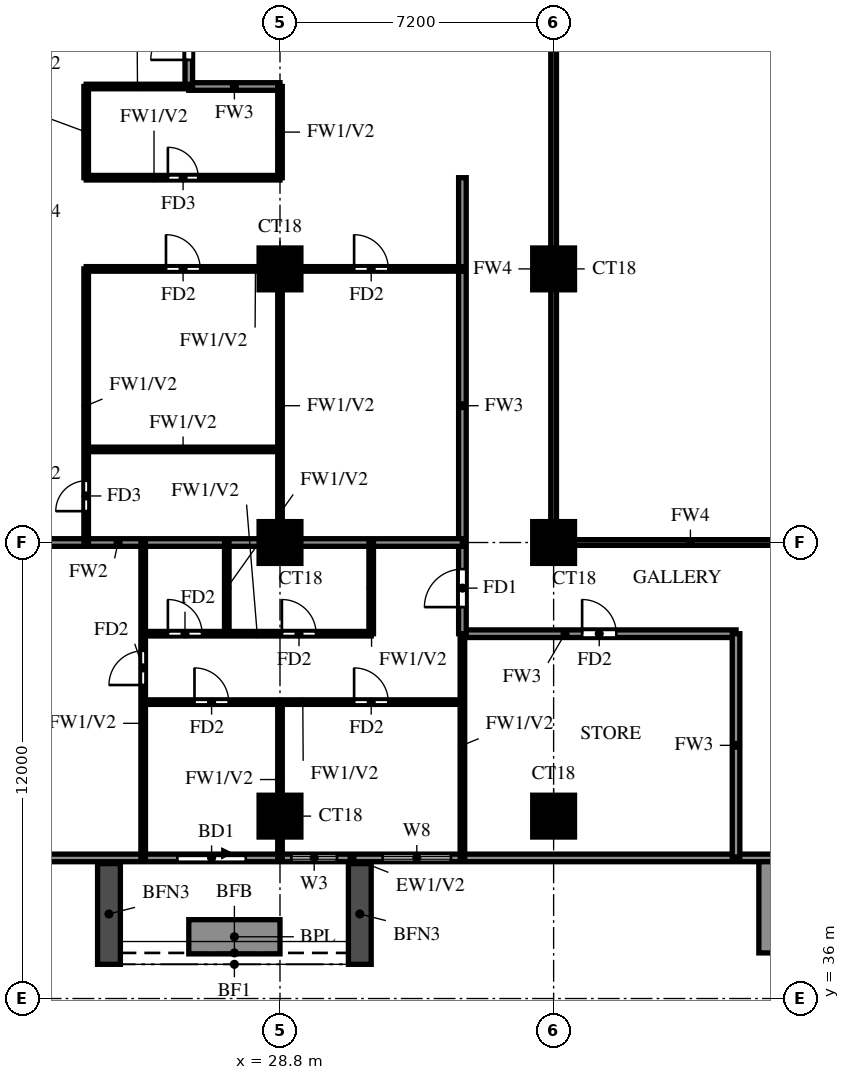
"""IFC4 building model, lengths in metres.
Left out: names, types, materials, properties, quantities, classifications, styles, units other than length and angle.
Written with IfcOpenShell. Run it as: python <this file> out.ifc"""

import sys

from ifc_helpers import new_model, si_unit, direction, frame, frame_2d, origin, origin_2d, place, context, subcontext, project, spatial, rectangle, extrude, source, transform, mapped, element, fill, save


model = new_model("IFC4")
c1 = context("Model", 3, precision=1e-05, world=origin(), true_north=direction((0.0, 1.0)))
c2 = subcontext(c1, "Body", "Model", "MODEL_VIEW")
j1 = project(units=[si_unit("LENGTHUNIT", "METRE"), si_unit("PLANEANGLEUNIT", "RADIAN")], contexts=[c1])
p1 = place(None, origin())
s1 = spatial("IfcSite", under=j1, at=p1, CompositionType="ELEMENT")
p2 = place(p1, origin())
s2 = spatial("IfcBuilding", under=s1, at=p2, CompositionType="ELEMENT")
p3 = place(p2, frame((0.0, 0.0, 120.0)))
s3 = spatial("IfcBuildingStorey", under=s2, at=p3, CompositionType="ELEMENT", Elevation=120.0)
m1 = source(origin(), c2, "Body", "SweptSolid", [
    extrude(rectangle(XDim=1.1, YDim=1.1, at=origin_2d()), origin(), (0.0, 0.0, 1.0), 3.2),
])
for number, where, z_axis, x_axis in (
    (1, (28.8, 40.8, 0.0), (0.0, 0.0, 1.0), (1.0, 0.0, 0.0)),
    (2, (36.0, 40.8, 0.0), (0.0, 0.0, 1.0), (1.0, 0.0, 0.0)),
    (3, (28.8, 48.0, 0.0), (0.0, 0.0, 1.0), (1.0, 0.0, 0.0)),
    (4, (36.0, 48.0, 0.0), (0.0, 0.0, 1.0), (1.0, 0.0, 0.0)),
    (5, (28.8, 55.2, 0.0), (0.0, 0.0, 1.0), (1.0, 0.0, 0.0)),
    (6, (36.0, 55.2, 0.0), (0.0, 0.0, 1.0), (1.0, 0.0, 0.0)),
):
    element("IfcColumn", number, at=place(p3, frame(where, z_axis=z_axis, x_axis=x_axis)), inside=s3, PredefinedType="COLUMN", context=c2, shape_type="MappedRepresentation", body=[
        mapped(m1, transform((0.0, 0.0, 0.0))),
    ])
p4 = place(p3, frame((18.2, 39.7, 0.0), z_axis=(0.0, 0.0, 1.0), x_axis=(1.0, 0.0, 0.0)))
e7 = element("IfcWall", 7, at=p4, inside=s3, PredefinedType="SOLIDWALL", context=c2, shape_type="SweptSolid", body=[
    extrude(rectangle(XDim=23.8, YDim=0.2, at=frame_2d((11.9, 0.0))), origin(), (0.0, 0.0, 1.0), 3.2),
])
p5 = place(p4, frame((7.9, 0.0, 0.0)))
e8 = element("IfcOpeningElement", 8, at=p5, cuts=e7, PredefinedType="OPENING", context=c2, shape_type="SweptSolid", body=[
    extrude(rectangle(XDim=1.8, YDim=2.4, at=frame_2d((0.9, 1.2))), frame((0.0, 0.11, 0.0), z_axis=(0.0, -1.0, 0.0), x_axis=(1.0, 0.0, 0.0)), (0.0, 0.0, 1.0), 0.22),
])
p6 = place(p4, frame((1.8, 0.0, 0.6)))
e9 = element("IfcOpeningElement", 9, at=p6, cuts=e7, PredefinedType="OPENING", context=c2, shape_type="SweptSolid", body=[
    extrude(rectangle(XDim=2.4, YDim=2.4, at=frame_2d((1.2, 1.2))), frame((0.0, 0.11, 0.0), z_axis=(0.0, -1.0, 0.0), x_axis=(1.0, 0.0, 0.0)), (0.0, 0.0, 1.0), 0.22),
])
p7 = place(p4, frame((10.9, 0.0, 0.6)))
e10 = element("IfcOpeningElement", 10, at=p7, cuts=e7, PredefinedType="OPENING", context=c2, shape_type="SweptSolid", body=[
    extrude(rectangle(XDim=1.2, YDim=2.4, at=frame_2d((0.6, 1.2))), frame((0.0, 0.11, 0.0), z_axis=(0.0, -1.0, 0.0), x_axis=(1.0, 0.0, 0.0)), (0.0, 0.0, 1.0), 0.22),
])
p8 = place(p4, frame((13.3, 0.0, 0.6)))
e11 = element("IfcOpeningElement", 11, at=p8, cuts=e7, PredefinedType="OPENING", context=c2, shape_type="SweptSolid", body=[
    extrude(rectangle(XDim=1.8, YDim=2.4, at=frame_2d((0.9, 1.2))), frame((0.0, 0.11, 0.0), z_axis=(0.0, -1.0, 0.0), x_axis=(1.0, 0.0, 0.0)), (0.0, 0.0, 1.0), 0.22),
])
for number, where, z_axis, x_axis in (
    (12, (24.3, 39.55, 0.0), (0.0, 0.0, 1.0), (0.0, -1.0, 0.0)),
    (13, (30.9, 39.55, 0.0), (0.0, 0.0, 1.0), (0.0, -1.0, 0.0)),
):
    element("IfcWall", number, at=place(p3, frame(where, z_axis=z_axis, x_axis=x_axis)), inside=s3, PredefinedType="SOLIDWALL", context=c2, shape_type="SweptSolid", body=[
        extrude(rectangle(XDim=2.65, YDim=0.6, at=frame_2d((1.325, 0.0))), origin(), (0.0, 0.0, 1.0), 2.85),
    ])
p9 = place(p3, frame((26.4, 37.625, 0.0), z_axis=(0.0, 0.0, 1.0), x_axis=(1.0, 0.0, 0.0)))
e14 = element("IfcWall", 14, at=p9, inside=s3, PredefinedType="SOLIDWALL", context=c2, shape_type="SweptSolid", body=[
    extrude(rectangle(XDim=2.4, YDim=0.9, at=frame_2d((1.2, 0.0))), origin(), (0.0, 0.0, 1.0), 0.9),
])
p10 = place(p3, frame((42.3, 37.2, -0.3), z_axis=(0.0, 0.0, 1.0), x_axis=(0.0, 1.0, 0.0)))
e15 = element("IfcWall", 15, at=p10, inside=s3, PredefinedType="SOLIDWALL", context=c2, shape_type="SweptSolid", body=[
    extrude(rectangle(XDim=2.4, YDim=1.8, at=frame_2d((1.2, 0.0))), origin(), (0.0, 0.0, 1.0), 3.5),
])
p11 = place(p3, frame((33.6, 45.6, 0.0), z_axis=(0.0, 0.0, 1.0), x_axis=(1.0, 0.0, 0.0)))
e16 = element("IfcWall", 16, at=p11, inside=s3, PredefinedType="SOLIDWALL", context=c2, shape_type="SweptSolid", body=[
    extrude(rectangle(XDim=7.2, YDim=0.2, at=frame_2d((3.6, 0.0))), origin(), (0.0, 0.0, 1.0), 3.2),
])
p12 = place(p11, frame((3.15, 0.0, 0.0)))
e17 = element("IfcOpeningElement", 17, at=p12, cuts=e16, PredefinedType="OPENING", context=c2, shape_type="SweptSolid", body=[
    extrude(rectangle(XDim=0.9, YDim=2.1, at=frame_2d((0.45, 1.05))), frame((0.0, 0.11, 0.0), z_axis=(0.0, -1.0, 0.0), x_axis=(1.0, 0.0, 0.0)), (0.0, 0.0, 1.0), 0.22),
])
p13 = place(p3, frame((26.4, 60.0, 0.0), z_axis=(0.0, 0.0, 1.0), x_axis=(1.0, 0.0, 0.0)))
e18 = element("IfcWall", 18, at=p13, inside=s3, PredefinedType="SOLIDWALL", context=c2, shape_type="SweptSolid", body=[
    extrude(rectangle(XDim=2.4, YDim=0.2, at=frame_2d((1.2, 0.0))), origin(), (0.0, 0.0, 1.0), 3.2),
])
p14 = place(p3, frame((26.4, 60.0, 0.0), z_axis=(0.0, 0.0, 1.0), x_axis=(0.0, 1.0, 0.0)))
e19 = element("IfcWall", 19, at=p14, inside=s3, PredefinedType="SOLIDWALL", context=c2, shape_type="SweptSolid", body=[
    extrude(rectangle(XDim=9.6, YDim=0.2, at=frame_2d((4.8, 0.0))), origin(), (0.0, 0.0, 1.0), 3.2),
])
p15 = place(p14, frame((0.7, 0.0, 0.0)))
e20 = element("IfcOpeningElement", 20, at=p15, cuts=e19, PredefinedType="OPENING", context=c2, shape_type="SweptSolid", body=[
    extrude(rectangle(XDim=1.0, YDim=2.1, at=frame_2d((0.5, 1.05))), frame((0.0, 0.11, 0.0), z_axis=(0.0, -1.0, 0.0), x_axis=(1.0, 0.0, 0.0)), (0.0, 0.0, 1.0), 0.22),
])
p16 = place(p14, frame((3.1, 0.0, 0.0)))
e21 = element("IfcOpeningElement", 21, at=p16, cuts=e19, PredefinedType="OPENING", context=c2, shape_type="SweptSolid", body=[
    extrude(rectangle(XDim=1.0, YDim=2.1, at=frame_2d((0.5, 1.05))), frame((0.0, 0.11, 0.0), z_axis=(0.0, -1.0, 0.0), x_axis=(1.0, 0.0, 0.0)), (0.0, 0.0, 1.0), 0.22),
])
p17 = place(p3, frame((33.6, 45.6, 0.0), z_axis=(0.0, 0.0, 1.0), x_axis=(0.0, 1.0, 0.0)))
e22 = element("IfcWall", 22, at=p17, inside=s3, PredefinedType="SOLIDWALL", context=c2, shape_type="SweptSolid", body=[
    extrude(rectangle(XDim=12.0, YDim=0.2, at=frame_2d((6.0, 0.0))), origin(), (0.0, 0.0, 1.0), 3.2),
])
p18 = place(p17, frame((0.7, 0.0, 0.0)))
e23 = element("IfcOpeningElement", 23, at=p18, cuts=e22, PredefinedType="OPENING", context=c2, shape_type="SweptSolid", body=[
    extrude(rectangle(XDim=1.0, YDim=2.1, at=frame_2d((0.5, 1.05))), frame((0.0, 0.11, 0.0), z_axis=(0.0, -1.0, 0.0), x_axis=(1.0, 0.0, 0.0)), (0.0, 0.0, 1.0), 0.22),
])
p19 = place(p3, frame((40.8, 39.725, 0.0), z_axis=(0.0, 0.0, 1.0), x_axis=(0.0, 1.0, 0.0)))
e24 = element("IfcWall", 24, at=p19, inside=s3, PredefinedType="SOLIDWALL", context=c2, shape_type="SweptSolid", body=[
    extrude(rectangle(XDim=5.875, YDim=0.2, at=frame_2d((2.938, 0.0))), origin(), (0.0, 0.0, 1.0), 3.2),
])
p20 = place(p3, frame((14.525, 48.0, 0.0), z_axis=(0.0, 0.0, 1.0), x_axis=(1.0, 0.0, 0.0)))
e25 = element("IfcWall", 25, at=p20, inside=s3, PredefinedType="SOLIDWALL", context=c2, shape_type="SweptSolid", body=[
    extrude(rectangle(XDim=19.075, YDim=0.2, at=frame_2d((9.538, 0.0))), origin(), (0.0, 0.0, 1.0), 3.2),
])
p21 = place(p3, frame((25.2, 43.8, 0.0), z_axis=(0.0, 0.0, 1.0), x_axis=(1.0, 0.0, 0.0)))
e26 = element("IfcWall", 26, at=p21, inside=s3, PredefinedType="PARTITIONING", context=c2, shape_type="SweptSolid", body=[
    extrude(rectangle(XDim=8.4, YDim=0.12, at=frame_2d((4.2, 0.0))), origin(), (0.0, 0.0, 1.0), 3.2),
])
p22 = place(p21, frame((1.35, 0.0, 0.0)))
e27 = element("IfcOpeningElement", 27, at=p22, cuts=e26, PredefinedType="OPENING", context=c2, shape_type="SweptSolid", body=[
    extrude(rectangle(XDim=0.9, YDim=2.1, at=frame_2d((0.45, 1.05))), frame((0.0, 0.07, 0.0), z_axis=(0.0, -1.0, 0.0), x_axis=(1.0, 0.0, 0.0)), (0.0, 0.0, 1.0), 0.14),
])
p23 = place(p21, frame((5.55, 0.0, 0.0)))
e28 = element("IfcOpeningElement", 28, at=p23, cuts=e26, PredefinedType="OPENING", context=c2, shape_type="SweptSolid", body=[
    extrude(rectangle(XDim=0.9, YDim=2.1, at=frame_2d((0.45, 1.05))), frame((0.0, 0.07, 0.0), z_axis=(0.0, -1.0, 0.0), x_axis=(1.0, 0.0, 0.0)), (0.0, 0.0, 1.0), 0.14),
])
p24 = place(p3, frame((25.2, 45.6, 0.0), z_axis=(0.0, 0.0, 1.0), x_axis=(1.0, 0.0, 0.0)))
e29 = element("IfcWall", 29, at=p24, inside=s3, PredefinedType="PARTITIONING", context=c2, shape_type="SweptSolid", body=[
    extrude(rectangle(XDim=6.0, YDim=0.12, at=frame_2d((3.0, 0.0))), origin(), (0.0, 0.0, 1.0), 3.2),
])
p25 = place(p24, frame((0.65, 0.0, 0.0)))
e30 = element("IfcOpeningElement", 30, at=p25, cuts=e29, PredefinedType="OPENING", context=c2, shape_type="SweptSolid", body=[
    extrude(rectangle(XDim=0.9, YDim=2.1, at=frame_2d((0.45, 1.05))), frame((0.0, 0.07, 0.0), z_axis=(0.0, -1.0, 0.0), x_axis=(1.0, 0.0, 0.0)), (0.0, 0.0, 1.0), 0.14),
])
p26 = place(p24, frame((3.65, 0.0, 0.0)))
e31 = element("IfcOpeningElement", 31, at=p26, cuts=e29, PredefinedType="OPENING", context=c2, shape_type="SweptSolid", body=[
    extrude(rectangle(XDim=0.9, YDim=2.1, at=frame_2d((0.45, 1.05))), frame((0.0, 0.07, 0.0), z_axis=(0.0, -1.0, 0.0), x_axis=(1.0, 0.0, 0.0)), (0.0, 0.0, 1.0), 0.14),
])
p27 = place(p3, frame((23.7, 50.45, 0.0), z_axis=(0.0, 0.0, 1.0), x_axis=(1.0, 0.0, 0.0)))
e32 = element("IfcWall", 32, at=p27, inside=s3, PredefinedType="PARTITIONING", context=c2, shape_type="SweptSolid", body=[
    extrude(rectangle(XDim=5.1, YDim=0.12, at=frame_2d((2.55, 0.0))), origin(), (0.0, 0.0, 1.0), 3.2),
])
p28 = place(p3, frame((23.7, 55.2, 0.0), z_axis=(0.0, 0.0, 1.0), x_axis=(1.0, 0.0, 0.0)))
e33 = element("IfcWall", 33, at=p28, inside=s3, PredefinedType="PARTITIONING", context=c2, shape_type="SweptSolid", body=[
    extrude(rectangle(XDim=9.9, YDim=0.12, at=frame_2d((4.95, 0.0))), origin(), (0.0, 0.0, 1.0), 3.2),
])
p29 = place(p28, frame((2.1, 0.0, 0.0)))
e34 = element("IfcOpeningElement", 34, at=p29, cuts=e33, PredefinedType="OPENING", context=c2, shape_type="SweptSolid", body=[
    extrude(rectangle(XDim=0.9, YDim=2.1, at=frame_2d((0.45, 1.05))), frame((0.0, 0.07, 0.0), z_axis=(0.0, -1.0, 0.0), x_axis=(1.0, 0.0, 0.0)), (0.0, 0.0, 1.0), 0.14),
])
p30 = place(p28, frame((7.05, 0.0, 0.0)))
e35 = element("IfcOpeningElement", 35, at=p30, cuts=e33, PredefinedType="OPENING", context=c2, shape_type="SweptSolid", body=[
    extrude(rectangle(XDim=0.9, YDim=2.1, at=frame_2d((0.45, 1.05))), frame((0.0, 0.07, 0.0), z_axis=(0.0, -1.0, 0.0), x_axis=(1.0, 0.0, 0.0)), (0.0, 0.0, 1.0), 0.14),
])
p31 = place(p3, frame((23.7, 57.6, 0.0), z_axis=(0.0, 0.0, 1.0), x_axis=(1.0, 0.0, 0.0)))
e36 = element("IfcWall", 36, at=p31, inside=s3, PredefinedType="PARTITIONING", context=c2, shape_type="SweptSolid", body=[
    extrude(rectangle(XDim=5.1, YDim=0.12, at=frame_2d((2.55, 0.0))), origin(), (0.0, 0.0, 1.0), 3.2),
])
p32 = place(p31, frame((2.15, 0.0, 0.0)))
e37 = element("IfcOpeningElement", 37, at=p32, cuts=e36, PredefinedType="OPENING", context=c2, shape_type="SweptSolid", body=[
    extrude(rectangle(XDim=0.8, YDim=2.1, at=frame_2d((0.4, 1.05))), frame((0.0, 0.07, 0.0), z_axis=(0.0, -1.0, 0.0), x_axis=(1.0, 0.0, 0.0)), (0.0, 0.0, 1.0), 0.14),
])
p33 = place(p3, frame((23.7, 60.0, 0.0), z_axis=(0.0, 0.0, 1.0), x_axis=(1.0, 0.0, 0.0)))
e38 = element("IfcWall", 38, at=p33, inside=s3, PredefinedType="PARTITIONING", context=c2, shape_type="SweptSolid", body=[
    extrude(rectangle(XDim=2.7, YDim=0.12, at=frame_2d((1.35, 0.0))), origin(), (0.0, 0.0, 1.0), 3.2),
])
p34 = place(p3, frame((23.7, 48.0, 0.0), z_axis=(0.0, 0.0, 1.0), x_axis=(0.0, 1.0, 0.0)))
e39 = element("IfcWall", 39, at=p34, inside=s3, PredefinedType="PARTITIONING", context=c2, shape_type="SweptSolid", body=[
    extrude(rectangle(XDim=7.2, YDim=0.12, at=frame_2d((3.6, 0.0))), origin(), (0.0, 0.0, 1.0), 3.2),
])
p35 = place(p34, frame((0.825, 0.0, 0.0)))
e40 = element("IfcOpeningElement", 40, at=p35, cuts=e39, PredefinedType="OPENING", context=c2, shape_type="SweptSolid", body=[
    extrude(rectangle(XDim=0.8, YDim=2.1, at=frame_2d((0.4, 1.05))), frame((0.0, 0.07, 0.0), z_axis=(0.0, -1.0, 0.0), x_axis=(1.0, 0.0, 0.0)), (0.0, 0.0, 1.0), 0.14),
])
p36 = place(p3, frame((23.7, 57.6, 0.0), z_axis=(0.0, 0.0, 1.0), x_axis=(0.0, 1.0, 0.0)))
e41 = element("IfcWall", 41, at=p36, inside=s3, PredefinedType="PARTITIONING", context=c2, shape_type="SweptSolid", body=[
    extrude(rectangle(XDim=2.4, YDim=0.12, at=frame_2d((1.2, 0.0))), origin(), (0.0, 0.0, 1.0), 3.2),
])
p37 = place(p3, frame((25.2, 39.725, 0.0), z_axis=(0.0, 0.0, 1.0), x_axis=(0.0, 1.0, 0.0)))
e42 = element("IfcWall", 42, at=p37, inside=s3, PredefinedType="PARTITIONING", context=c2, shape_type="SweptSolid", body=[
    extrude(rectangle(XDim=8.275, YDim=0.12, at=frame_2d((4.137, 0.0))), origin(), (0.0, 0.0, 1.0), 3.2),
])
p38 = place(p37, frame((4.525, 0.0, 0.0)))
e43 = element("IfcOpeningElement", 43, at=p38, cuts=e42, PredefinedType="OPENING", context=c2, shape_type="SweptSolid", body=[
    extrude(rectangle(XDim=0.9, YDim=2.1, at=frame_2d((0.45, 1.05))), frame((0.0, 0.07, 0.0), z_axis=(0.0, -1.0, 0.0), x_axis=(1.0, 0.0, 0.0)), (0.0, 0.0, 1.0), 0.14),
])
p39 = place(p3, frame((27.4, 45.6, 0.0), z_axis=(0.0, 0.0, 1.0), x_axis=(0.0, 1.0, 0.0)))
e44 = element("IfcWall", 44, at=p39, inside=s3, PredefinedType="PARTITIONING", context=c2, shape_type="SweptSolid", body=[
    extrude(rectangle(XDim=2.4, YDim=0.12, at=frame_2d((1.2, 0.0))), origin(), (0.0, 0.0, 1.0), 3.2),
])
p40 = place(p3, frame((28.8, 39.725, 0.0), z_axis=(0.0, 0.0, 1.0), x_axis=(0.0, 1.0, 0.0)))
e45 = element("IfcWall", 45, at=p40, inside=s3, PredefinedType="PARTITIONING", context=c2, shape_type="SweptSolid", body=[
    extrude(rectangle(XDim=4.075, YDim=0.12, at=frame_2d((2.038, 0.0))), origin(), (0.0, 0.0, 1.0), 3.2),
])
p41 = place(p3, frame((28.8, 48.0, 0.0), z_axis=(0.0, 0.0, 1.0), x_axis=(0.0, 1.0, 0.0)))
e46 = element("IfcWall", 46, at=p41, inside=s3, PredefinedType="PARTITIONING", context=c2, shape_type="SweptSolid", body=[
    extrude(rectangle(XDim=7.2, YDim=0.12, at=frame_2d((3.6, 0.0))), origin(), (0.0, 0.0, 1.0), 3.2),
])
for number, where, z_axis, x_axis in (
    (47, (28.8, 57.6, 0.0), (0.0, 0.0, 1.0), (0.0, 1.0, 0.0)),
    (48, (31.2, 45.6, 0.0), (0.0, 0.0, 1.0), (0.0, 1.0, 0.0)),
):
    element("IfcWall", number, at=place(p3, frame(where, z_axis=z_axis, x_axis=x_axis)), inside=s3, PredefinedType="PARTITIONING", context=c2, shape_type="SweptSolid", body=[
        extrude(rectangle(XDim=2.4, YDim=0.12, at=frame_2d((1.2, 0.0))), origin(), (0.0, 0.0, 1.0), 3.2),
    ])
p42 = place(p3, frame((33.6, 39.725, 0.0), z_axis=(0.0, 0.0, 1.0), x_axis=(0.0, 1.0, 0.0)))
e49 = element("IfcWall", 49, at=p42, inside=s3, PredefinedType="PARTITIONING", context=c2, shape_type="SweptSolid", body=[
    extrude(rectangle(XDim=5.875, YDim=0.12, at=frame_2d((2.938, 0.0))), origin(), (0.0, 0.0, 1.0), 3.2),
])
p43 = place(p3, frame((36.0, 48.0, 0.0), z_axis=(0.0, 0.0, 1.0), x_axis=(1.0, 0.0, 0.0)))
e50 = element("IfcWall", 50, at=p43, inside=s3, PredefinedType="SOLIDWALL", context=c2, shape_type="SweptSolid", body=[
    extrude(rectangle(XDim=7.2, YDim=0.15, at=frame_2d((3.6, 0.0))), origin(), (0.0, 0.0, 1.0), 2.3),
])
p44 = place(p3, frame((36.0, 48.0, 0.0), z_axis=(0.0, 0.0, 1.0), x_axis=(0.0, 1.0, 0.0)))
e51 = element("IfcWall", 51, at=p44, inside=s3, PredefinedType="SOLIDWALL", context=c2, shape_type="SweptSolid", body=[
    extrude(rectangle(XDim=14.4, YDim=0.15, at=frame_2d((7.2, 0.0))), origin(), (0.0, 0.0, 1.0), 2.3),
])
p45 = place(p5, origin())
e52 = element("IfcDoor", 52, at=p45, inside=s3, OperationType="DOUBLE_DOOR_SLIDING", PredefinedType="DOOR", context=c2, shape_type="SweptSolid", body=[
    extrude(rectangle(XDim=1.8, YDim=2.4, at=frame_2d((0.9, 1.2))), frame((0.0, 0.025, 0.0), z_axis=(0.0, -1.0, 0.0), x_axis=(1.0, 0.0, 0.0)), (0.0, 0.0, 1.0), 0.05),
])
fill(e8, e52)
p46 = place(p7, origin())
e53 = element("IfcWindow", 53, at=p46, inside=s3, PartitioningType="SINGLE_PANEL", PredefinedType="WINDOW", context=c2, shape_type="SweptSolid", body=[
    extrude(rectangle(XDim=1.2, YDim=2.4, at=frame_2d((0.6, 1.2))), frame((0.0, 0.03, 0.0), z_axis=(0.0, -1.0, 0.0), x_axis=(1.0, 0.0, 0.0)), (0.0, 0.0, 1.0), 0.06),
])
fill(e10, e53)
p47 = place(p8, origin())
e54 = element("IfcWindow", 54, at=p47, inside=s3, PartitioningType="DOUBLE_PANEL_VERTICAL", PredefinedType="WINDOW", context=c2, shape_type="SweptSolid", body=[
    extrude(rectangle(XDim=1.8, YDim=2.4, at=frame_2d((0.9, 1.2))), frame((0.0, 0.03, 0.0), z_axis=(0.0, -1.0, 0.0), x_axis=(1.0, 0.0, 0.0)), (0.0, 0.0, 1.0), 0.06),
])
fill(e11, e54)
p48 = place(p18, origin())
e55 = element("IfcDoor", 55, at=p48, inside=s3, OperationType="SINGLE_SWING_LEFT", PredefinedType="DOOR", context=c2, shape_type="SweptSolid", body=[
    extrude(rectangle(XDim=1.0, YDim=2.1, at=frame_2d((0.5, 1.05))), frame((0.0, 0.025, 0.0), z_axis=(0.0, -1.0, 0.0), x_axis=(1.0, 0.0, 0.0)), (0.0, 0.0, 1.0), 0.05),
])
fill(e23, e55)
p49 = place(p38, origin())
e56 = element("IfcDoor", 56, at=p49, inside=s3, OperationType="SINGLE_SWING_LEFT", PredefinedType="DOOR", context=c2, shape_type="SweptSolid", body=[
    extrude(rectangle(XDim=0.9, YDim=2.1, at=frame_2d((0.45, 1.05))), frame((0.0, 0.025, 0.0), z_axis=(0.0, -1.0, 0.0), x_axis=(1.0, 0.0, 0.0)), (0.0, 0.0, 1.0), 0.05),
])
fill(e43, e56)
p50 = place(p22, origin())
e57 = element("IfcDoor", 57, at=p50, inside=s3, OperationType="SINGLE_SWING_RIGHT", PredefinedType="DOOR", context=c2, shape_type="SweptSolid", body=[
    extrude(rectangle(XDim=0.9, YDim=2.1, at=frame_2d((0.45, 1.05))), frame((0.0, 0.025, 0.0), z_axis=(0.0, -1.0, 0.0), x_axis=(1.0, 0.0, 0.0)), (0.0, 0.0, 1.0), 0.05),
])
fill(e27, e57)
p51 = place(p23, origin())
e58 = element("IfcDoor", 58, at=p51, inside=s3, OperationType="SINGLE_SWING_LEFT", PredefinedType="DOOR", context=c2, shape_type="SweptSolid", body=[
    extrude(rectangle(XDim=0.9, YDim=2.1, at=frame_2d((0.45, 1.05))), frame((0.0, 0.025, 0.0), z_axis=(0.0, -1.0, 0.0), x_axis=(1.0, 0.0, 0.0)), (0.0, 0.0, 1.0), 0.05),
])
fill(e28, e58)
p52 = place(p25, origin())
e59 = element("IfcDoor", 59, at=p52, inside=s3, OperationType="SINGLE_SWING_LEFT", PredefinedType="DOOR", context=c2, shape_type="SweptSolid", body=[
    extrude(rectangle(XDim=0.9, YDim=2.1, at=frame_2d((0.45, 1.05))), frame((0.0, 0.025, 0.0), z_axis=(0.0, -1.0, 0.0), x_axis=(1.0, 0.0, 0.0)), (0.0, 0.0, 1.0), 0.05),
])
fill(e30, e59)
p53 = place(p26, origin())
e60 = element("IfcDoor", 60, at=p53, inside=s3, OperationType="SINGLE_SWING_RIGHT", PredefinedType="DOOR", context=c2, shape_type="SweptSolid", body=[
    extrude(rectangle(XDim=0.9, YDim=2.1, at=frame_2d((0.45, 1.05))), frame((0.0, 0.025, 0.0), z_axis=(0.0, -1.0, 0.0), x_axis=(1.0, 0.0, 0.0)), (0.0, 0.0, 1.0), 0.05),
])
fill(e31, e60)
p54 = place(p12, origin())
e61 = element("IfcDoor", 61, at=p54, inside=s3, OperationType="SINGLE_SWING_LEFT", PredefinedType="DOOR", context=c2, shape_type="SweptSolid", body=[
    extrude(rectangle(XDim=0.9, YDim=2.1, at=frame_2d((0.45, 1.05))), frame((0.0, 0.025, 0.0), z_axis=(0.0, -1.0, 0.0), x_axis=(1.0, 0.0, 0.0)), (0.0, 0.0, 1.0), 0.05),
])
fill(e17, e61)
p55 = place(p15, origin())
e62 = element("IfcDoor", 62, at=p55, inside=s3, OperationType="SINGLE_SWING_LEFT", PredefinedType="DOOR", context=c2, shape_type="SweptSolid", body=[
    extrude(rectangle(XDim=1.0, YDim=2.1, at=frame_2d((0.5, 1.05))), frame((0.0, 0.025, 0.0), z_axis=(0.0, -1.0, 0.0), x_axis=(1.0, 0.0, 0.0)), (0.0, 0.0, 1.0), 0.05),
])
fill(e20, e62)
p56 = place(p35, origin())
e63 = element("IfcDoor", 63, at=p56, inside=s3, OperationType="SINGLE_SWING_RIGHT", PredefinedType="DOOR", context=c2, shape_type="SweptSolid", body=[
    extrude(rectangle(XDim=0.8, YDim=2.1, at=frame_2d((0.4, 1.05))), frame((0.0, 0.025, 0.0), z_axis=(0.0, -1.0, 0.0), x_axis=(1.0, 0.0, 0.0)), (0.0, 0.0, 1.0), 0.05),
])
fill(e40, e63)
p57 = place(p29, origin())
e64 = element("IfcDoor", 64, at=p57, inside=s3, OperationType="SINGLE_SWING_LEFT", PredefinedType="DOOR", context=c2, shape_type="SweptSolid", body=[
    extrude(rectangle(XDim=0.9, YDim=2.1, at=frame_2d((0.45, 1.05))), frame((0.0, 0.025, 0.0), z_axis=(0.0, -1.0, 0.0), x_axis=(1.0, 0.0, 0.0)), (0.0, 0.0, 1.0), 0.05),
])
fill(e34, e64)
p58 = place(p32, origin())
e65 = element("IfcDoor", 65, at=p58, inside=s3, OperationType="SINGLE_SWING_LEFT", PredefinedType="DOOR", context=c2, shape_type="SweptSolid", body=[
    extrude(rectangle(XDim=0.8, YDim=2.1, at=frame_2d((0.4, 1.05))), frame((0.0, 0.025, 0.0), z_axis=(0.0, -1.0, 0.0), x_axis=(1.0, 0.0, 0.0)), (0.0, 0.0, 1.0), 0.05),
])
fill(e37, e65)
p59 = place(p30, origin())
e66 = element("IfcDoor", 66, at=p59, inside=s3, OperationType="SINGLE_SWING_RIGHT", PredefinedType="DOOR", context=c2, shape_type="SweptSolid", body=[
    extrude(rectangle(XDim=0.9, YDim=2.1, at=frame_2d((0.45, 1.05))), frame((0.0, 0.025, 0.0), z_axis=(0.0, -1.0, 0.0), x_axis=(1.0, 0.0, 0.0)), (0.0, 0.0, 1.0), 0.05),
])
fill(e35, e66)
save(model, sys.argv[1])
